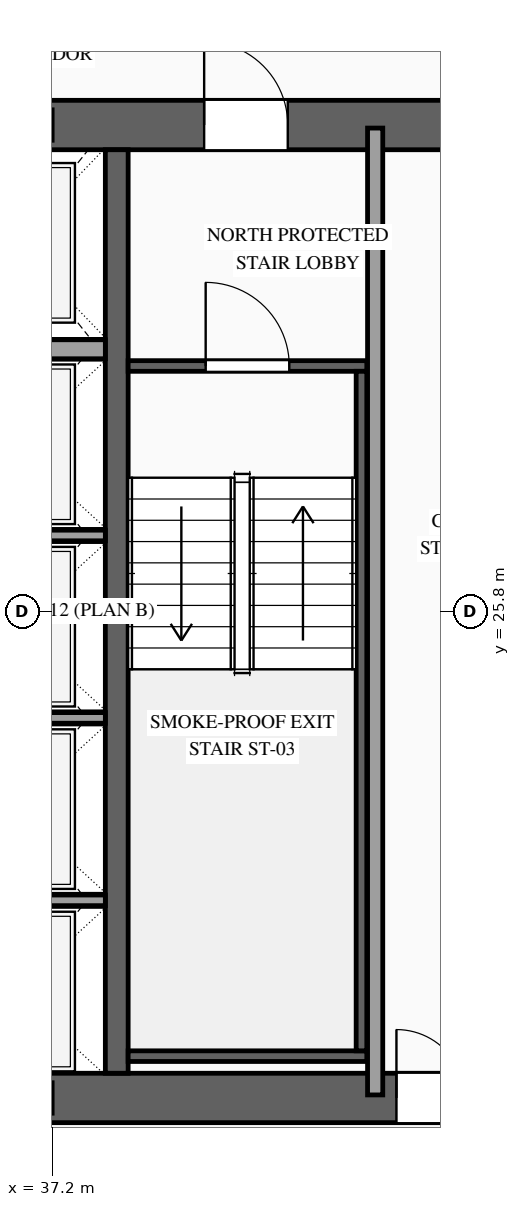
"""IFC4 building model, lengths in metres.
Left out: names, types, materials, properties, quantities, classifications, styles, units other than length and angle.
Written with IfcOpenShell. Run it as: python <this file> out.ifc"""

import sys

from ifc_helpers import new_model, si_unit, direction, frame, frame_2d, origin, place, context, subcontext, project, spatial, rectangle, extrude, source, transform, mapped, element, fill, save


model = new_model("IFC4")
c1 = context("Model", 3, precision=1e-05, world=origin(), true_north=direction((0.0, 1.0)))
c2 = subcontext(c1, "Body", "Model", "MODEL_VIEW")
j1 = project(units=[si_unit("LENGTHUNIT", "METRE"), si_unit("PLANEANGLEUNIT", "RADIAN")], contexts=[c1])
p1 = place(None, origin())
s1 = spatial("IfcSite", under=j1, at=p1, CompositionType="ELEMENT")
p2 = place(p1, origin())
s2 = spatial("IfcBuilding", under=s1, at=p2, CompositionType="ELEMENT")
p3 = place(p2, frame((0.0, 0.0, 202.0)))
s3 = spatial("IfcBuildingStorey", under=s2, at=p3, CompositionType="ELEMENT", Elevation=202.0)
p4 = place(p3, frame((23.475, 19.4, 0.0), z_axis=(0.0, 0.0, 1.0), x_axis=(1.0, 0.0, 0.0)))
e1 = element("IfcWall", 1, at=p4, inside=s3, PredefinedType="SHEAR", context=c2, shape_type="SweptSolid", body=[
    extrude(rectangle(XDim=27.05, YDim=0.65, at=frame_2d((13.525, 0.0))), origin(), (0.0, 0.0, 1.0), 3.5),
])
p5 = place(p4, frame((1.975, 0.0, 0.0)))
e2 = element("IfcOpeningElement", 2, at=p5, cuts=e1, PredefinedType="OPENING", context=c2, shape_type="SweptSolid", body=[
    extrude(rectangle(XDim=1.1, YDim=2.2, at=frame_2d((0.55, 1.1))), frame((0.0, 0.34, 0.0), z_axis=(0.0, -1.0, 0.0), x_axis=(1.0, 0.0, 0.0)), (0.0, 0.0, 1.0), 0.68),
])
p6 = place(p4, frame((9.875, 0.0, 0.0)))
e3 = element("IfcOpeningElement", 3, at=p6, cuts=e1, PredefinedType="OPENING", context=c2, shape_type="SweptSolid", body=[
    extrude(rectangle(XDim=1.1, YDim=2.2, at=frame_2d((0.55, 1.1))), frame((0.0, 0.34, 0.0), z_axis=(0.0, -1.0, 0.0), x_axis=(1.0, 0.0, 0.0)), (0.0, 0.0, 1.0), 0.68),
])
p7 = place(p4, frame((23.075, 0.0, 0.0)))
e4 = element("IfcOpeningElement", 4, at=p7, cuts=e1, PredefinedType="OPENING", context=c2, shape_type="SweptSolid", body=[
    extrude(rectangle(XDim=1.1, YDim=2.2, at=frame_2d((0.55, 1.1))), frame((0.0, 0.34, 0.0), z_axis=(0.0, -1.0, 0.0), x_axis=(1.0, 0.0, 0.0)), (0.0, 0.0, 1.0), 0.68),
])
p8 = place(p4, frame((19.695, 0.0, 0.0)))
e5 = element("IfcOpeningElement", 5, at=p8, cuts=e1, PredefinedType="OPENING", context=c2, shape_type="SweptSolid", body=[
    extrude(rectangle(XDim=0.9, YDim=2.15, at=frame_2d((0.45, 1.075))), frame((0.0, 0.34, 0.0), z_axis=(0.0, -1.0, 0.0), x_axis=(1.0, 0.0, 0.0)), (0.0, 0.0, 1.0), 0.68),
])
p9 = place(p4, frame((18.255, 0.0, 0.0)))
e6 = element("IfcOpeningElement", 6, at=p9, cuts=e1, PredefinedType="OPENING", context=c2, shape_type="SweptSolid", body=[
    extrude(rectangle(XDim=0.9, YDim=2.15, at=frame_2d((0.45, 1.075))), frame((0.0, 0.34, 0.0), z_axis=(0.0, -1.0, 0.0), x_axis=(1.0, 0.0, 0.0)), (0.0, 0.0, 1.0), 0.68),
])
p10 = place(p3, frame((23.475, 32.2, 0.0), z_axis=(0.0, 0.0, 1.0), x_axis=(1.0, 0.0, 0.0)))
e7 = element("IfcWall", 7, at=p10, inside=s3, PredefinedType="SHEAR", context=c2, shape_type="SweptSolid", body=[
    extrude(rectangle(XDim=27.05, YDim=0.65, at=frame_2d((13.525, 0.0))), origin(), (0.0, 0.0, 1.0), 3.5),
])
p11 = place(p10, frame((4.595, 0.0, 0.0)))
e8 = element("IfcOpeningElement", 8, at=p11, cuts=e7, PredefinedType="OPENING", context=c2, shape_type="SweptSolid", body=[
    extrude(rectangle(XDim=0.9, YDim=2.15, at=frame_2d((0.45, 1.075))), frame((0.0, 0.34, 0.0), z_axis=(0.0, -1.0, 0.0), x_axis=(1.0, 0.0, 0.0)), (0.0, 0.0, 1.0), 0.68),
])
p12 = place(p10, frame((9.875, 0.0, 0.0)))
e9 = element("IfcOpeningElement", 9, at=p12, cuts=e7, PredefinedType="OPENING", context=c2, shape_type="SweptSolid", body=[
    extrude(rectangle(XDim=1.1, YDim=2.2, at=frame_2d((0.55, 1.1))), frame((0.0, 0.34, 0.0), z_axis=(0.0, -1.0, 0.0), x_axis=(1.0, 0.0, 0.0)), (0.0, 0.0, 1.0), 0.68),
])
p13 = place(p10, frame((15.725, 0.0, 0.0)))
e10 = element("IfcOpeningElement", 10, at=p13, cuts=e7, PredefinedType="OPENING", context=c2, shape_type="SweptSolid", body=[
    extrude(rectangle(XDim=1.1, YDim=2.2, at=frame_2d((0.55, 1.1))), frame((0.0, 0.34, 0.0), z_axis=(0.0, -1.0, 0.0), x_axis=(1.0, 0.0, 0.0)), (0.0, 0.0, 1.0), 0.68),
])
m1 = source(origin(), c2, "Body", "SweptSolid", [
    extrude(rectangle(XDim=12.15, YDim=0.3, at=frame_2d((6.075, 0.0))), origin(), (0.0, 0.0, 1.0), 3.5),
])
p14 = place(p3, frame((38.05, 19.725, 0.0), z_axis=(0.0, 0.0, 1.0), x_axis=(0.0, 1.0, 0.0)))
e11 = element("IfcWall", 11, at=p14, inside=s3, PredefinedType="SOLIDWALL", context=c2, shape_type="MappedRepresentation", body=[
    mapped(m1, transform((0.0, 0.0, 0.0), scale=1.0)),
])
m2 = source(origin(), c2, "Body", "SweptSolid", [
    extrude(rectangle(XDim=2.4, YDim=0.14, at=frame_2d((1.2, 0.0))), origin(), (0.0, 0.0, 1.0), 3.28),
])
for number, where, z_axis, x_axis in (
    (12, (35.5, 22.0, 0.0), (0.0, 0.0, 1.0), (1.0, 0.0, 0.0)),
    (13, (35.5, 24.4, 0.0), (0.0, 0.0, 1.0), (1.0, 0.0, 0.0)),
    (14, (35.5, 26.8, 0.0), (0.0, 0.0, 1.0), (1.0, 0.0, 0.0)),
):
    element("IfcWall", number, at=place(p3, frame(where, z_axis=z_axis, x_axis=x_axis)), inside=s3, PredefinedType="SOLIDWALL", context=c2, shape_type="MappedRepresentation", body=[
        mapped(m2, transform((0.0, 0.0, 0.0), scale=1.0)),
    ])
m3 = source(origin(), c2, "Body", "SweptSolid", [
    extrude(rectangle(XDim=2.4, YDim=0.25, at=frame_2d((1.2, 0.0))), origin(), (0.0, 0.0, 1.0), 3.28),
])
p15 = place(p3, frame((35.5, 29.25, 0.0), z_axis=(0.0, 0.0, 1.0), x_axis=(1.0, 0.0, 0.0)))
e15 = element("IfcWall", 15, at=p15, inside=s3, PredefinedType="SOLIDWALL", context=c2, shape_type="MappedRepresentation", body=[
    mapped(m3, transform((0.0, 0.0, 0.0), scale=1.0)),
])
p16 = place(p3, frame((38.2, 29.03, 0.0), z_axis=(0.0, 0.0, 1.0), x_axis=(1.0, 0.0, 0.0)))
e16 = element("IfcWall", 16, at=p16, inside=s3, PredefinedType="SOLIDWALL", context=c2, shape_type="SweptSolid", body=[
    extrude(rectangle(XDim=3.14, YDim=0.14, at=frame_2d((1.57, 0.0))), origin(), (0.0, 0.0, 1.0), 3.28),
])
p17 = place(p16, frame((1.02, 0.0, 0.0)))
e17 = element("IfcOpeningElement", 17, at=p17, cuts=e16, PredefinedType="OPENING", context=c2, shape_type="SweptSolid", body=[
    extrude(rectangle(XDim=1.1, YDim=2.2, at=frame_2d((0.55, 1.1))), frame((0.0, 0.085, 0.0), z_axis=(0.0, -1.0, 0.0), x_axis=(1.0, 0.0, 0.0)), (0.0, 0.0, 1.0), 0.17),
])
m4 = source(origin(), c2, "Body", "SweptSolid", [
    extrude(rectangle(XDim=3.14, YDim=0.14, at=frame_2d((1.57, 0.0))), origin(), (0.0, 0.0, 1.0), 3.28),
])
p18 = place(p3, frame((38.2, 19.95, 0.0), z_axis=(0.0, 0.0, 1.0), x_axis=(1.0, 0.0, 0.0)))
e18 = element("IfcWall", 18, at=p18, inside=s3, PredefinedType="SOLIDWALL", context=c2, shape_type="MappedRepresentation", body=[
    mapped(m4, transform((0.0, 0.0, 0.0), scale=1.0)),
])
m5 = source(origin(), c2, "Body", "SweptSolid", [
    extrude(rectangle(XDim=8.94, YDim=0.14, at=frame_2d((4.47, 0.0))), origin(), (0.0, 0.0, 1.0), 3.28),
])
p19 = place(p3, frame((41.27, 20.02, 0.0), z_axis=(0.0, 0.0, 1.0), x_axis=(0.0, 1.0, 0.0)))
e19 = element("IfcWall", 19, at=p19, inside=s3, PredefinedType="SOLIDWALL", context=c2, shape_type="MappedRepresentation", body=[
    mapped(m5, transform((0.0, 0.0, 0.0), scale=1.0)),
])
m6 = source(origin(), c2, "Body", "SweptSolid", [
    extrude(rectangle(XDim=12.72, YDim=0.2, at=frame_2d((6.36, 0.0))), origin(), (0.0, 0.0, 1.0), 3.28),
])
p20 = place(p3, frame((41.45, 19.44, 0.0), z_axis=(0.0, 0.0, 1.0), x_axis=(0.0, 1.0, 0.0)))
e20 = element("IfcWall", 20, at=p20, inside=s3, PredefinedType="PARTITIONING", context=c2, shape_type="MappedRepresentation", body=[
    mapped(m6, transform((0.0, 0.0, 0.0), scale=1.0)),
])
m7 = source(origin(), c2, "Body", "SweptSolid", [
    extrude(rectangle(XDim=1.1, YDim=2.2, at=frame_2d((0.55, 1.1))), frame((0.0, 0.025, 0.0), z_axis=(0.0, -1.0, 0.0), x_axis=(1.0, 0.0, 0.0)), (0.0, 0.0, 1.0), 0.05),
])
p21 = place(p17, origin())
e21 = element("IfcDoor", 21, at=p21, inside=s3, OperationType="SINGLE_SWING_LEFT", PredefinedType="DOOR", context=c2, shape_type="MappedRepresentation", body=[
    mapped(m7, transform((0.0, 0.0, 0.0), scale=1.0)),
])
fill(e17, e21)
p22 = place(p13, origin())
e22 = element("IfcDoor", 22, at=p22, inside=s3, OperationType="SINGLE_SWING_LEFT", PredefinedType="DOOR", context=c2, shape_type="MappedRepresentation", body=[
    mapped(m7, transform((0.0, 0.0, 0.0), scale=1.0)),
])
fill(e10, e22)
m8 = source(origin(), c2, "Body", "SweptSolid", [
    extrude(rectangle(XDim=0.9, YDim=2.15, at=frame_2d((0.45, 1.075))), frame((0.0, 0.025, 0.0), z_axis=(0.0, -1.0, 0.0), x_axis=(1.0, 0.0, 0.0)), (0.0, 0.0, 1.0), 0.05),
])
p23 = place(p9, origin())
e23 = element("IfcDoor", 23, at=p23, inside=s3, OperationType="SINGLE_SWING_LEFT", PredefinedType="DOOR", context=c2, shape_type="MappedRepresentation", body=[
    mapped(m8, transform((0.0, 0.0, 0.0), scale=1.0)),
])
fill(e6, e23)
save(model, sys.argv[1])
